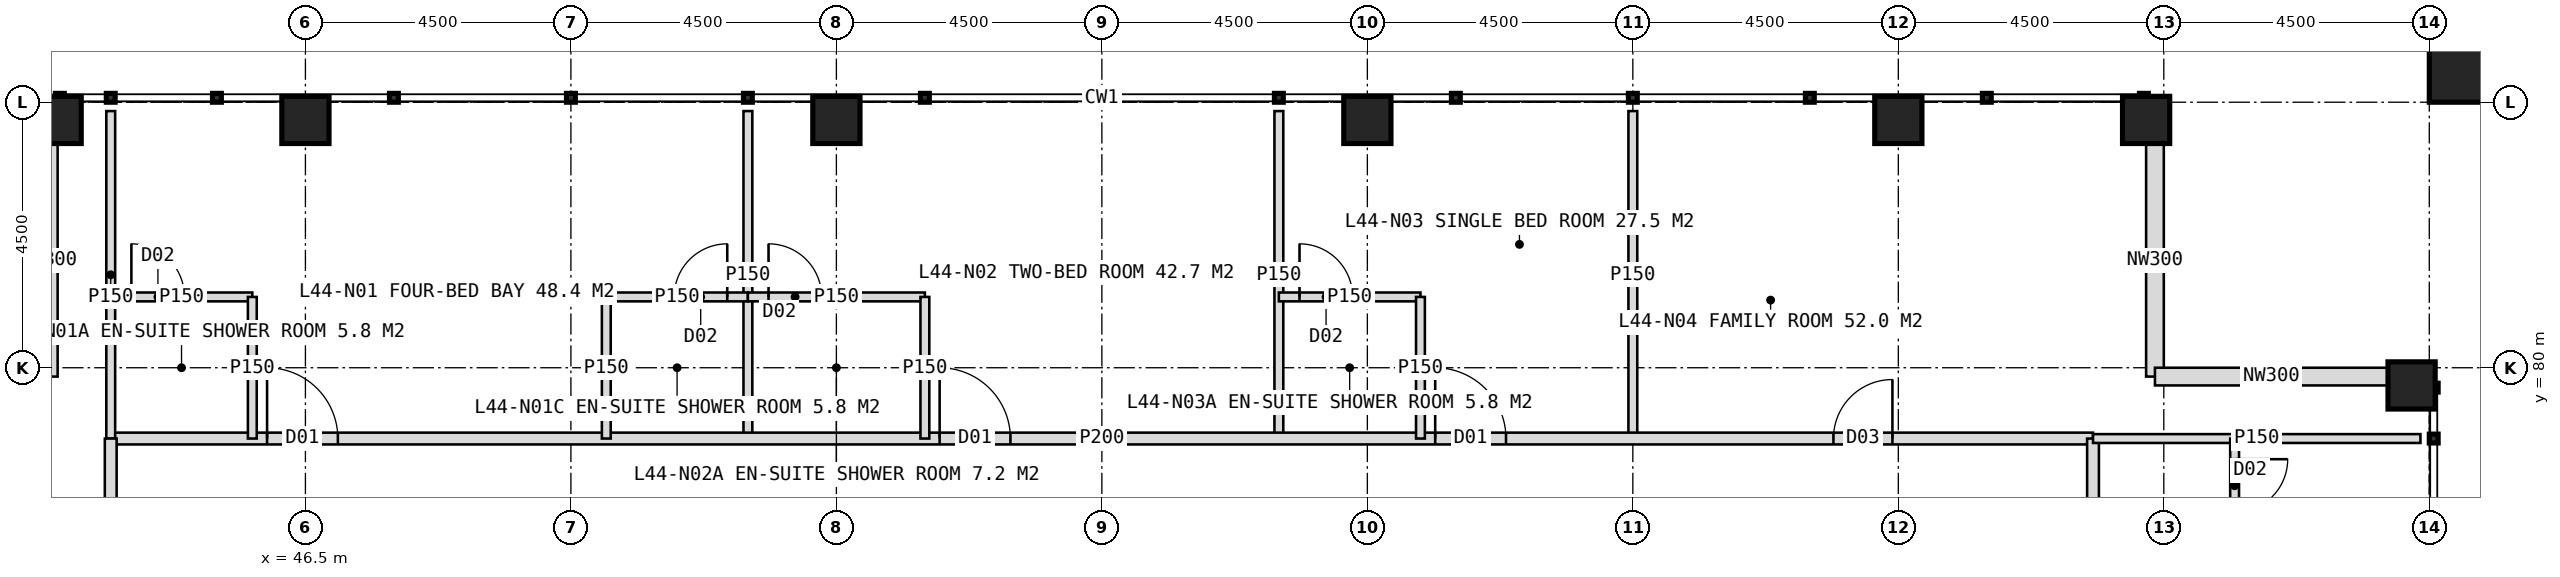
"""IFC4 building model, lengths in metres.
Left out: names, types, materials, properties, quantities, classifications, styles, units other than length and angle.
Written with IfcOpenShell. Run it as: python <this file> out.ifc"""

import sys

from ifc_helpers import new_model, si_unit, direction, frame, frame_2d, origin, origin_2d, place, context, subcontext, project, spatial, rectangle, hollow_rectangle, extrude, element, fill, save


model = new_model("IFC4")
c1 = context("Model", 3, precision=1e-05, world=origin(), true_north=direction((0.0, 1.0)))
c2 = subcontext(c1, "Body", "Model", "MODEL_VIEW")
j1 = project(units=[si_unit("LENGTHUNIT", "METRE"), si_unit("PLANEANGLEUNIT", "RADIAN")], contexts=[c1])
p1 = place(None, origin())
s1 = spatial("IfcSite", under=j1, at=p1, CompositionType="ELEMENT")
p2 = place(p1, origin())
s2 = spatial("IfcBuilding", under=s1, at=p2, CompositionType="ELEMENT")
p3 = place(p2, frame((0.0, 0.0, 185.0)))
s3 = spatial("IfcBuildingStorey", under=s2, at=p3, CompositionType="ELEMENT", Elevation=185.0)
for number, where, z_axis, x_axis in (
    (1, (42.3, 84.2, 0.0), (0.0, 0.0, 1.0), (1.0, 0.0, 0.0)),
    (2, (46.5, 84.2, 0.0), (0.0, 0.0, 1.0), (1.0, 0.0, 0.0)),
    (3, (55.5, 84.2, 0.0), (0.0, 0.0, 1.0), (1.0, 0.0, 0.0)),
    (4, (64.5, 84.2, 0.0), (0.0, 0.0, 1.0), (1.0, 0.0, 0.0)),
    (5, (73.5, 84.2, 0.0), (0.0, 0.0, 1.0), (1.0, 0.0, 0.0)),
    (6, (77.7, 84.2, 0.0), (0.0, 0.0, 1.0), (1.0, 0.0, 0.0)),
    (7, (82.2, 79.7, 0.0), (0.0, 0.0, 1.0), (1.0, 0.0, 0.0)),
):
    element("IfcColumn", number, at=place(p3, frame(where, z_axis=z_axis, x_axis=x_axis)), inside=s3, PredefinedType="COLUMN", context=c2, shape_type="SweptSolid", body=[
        extrude(hollow_rectangle(XDim=0.8, YDim=0.8, WallThickness=0.08, at=origin_2d()), origin(), (0.0, 0.0, 1.0), 4.0),
    ])
p4 = place(p3, frame((83.1, 85.1, 0.0), z_axis=(0.0, 0.0, 1.0), x_axis=(1.0, 0.0, 0.0)))
e8 = element("IfcColumn", 8, at=p4, inside=s3, PredefinedType="COLUMN", context=c2, shape_type="SweptSolid", body=[
    extrude(hollow_rectangle(XDim=1.2, YDim=1.2, WallThickness=0.07, at=origin_2d()), origin(), (0.0, 0.0, 1.0), 4.0),
])
for number, where, z_axis, x_axis in (
    (9, (77.85, 83.8, 0.0), (0.0, 0.0, 1.0), (0.0, -1.0, 0.0)),
    (10, (77.85, 79.85, 0.0), (0.0, 0.0, 1.0), (1.0, 0.0, 0.0)),
    (11, (42.15, 79.85, 0.0), (0.0, 0.0, 1.0), (0.0, 1.0, 0.0)),
):
    element("IfcWall", number, at=place(p3, frame(where, z_axis=z_axis, x_axis=x_axis)), inside=s3, PredefinedType="ELEMENTEDWALL", context=c2, shape_type="SweptSolid", body=[
        extrude(rectangle(XDim=3.95, YDim=0.3, at=frame_2d((1.975, 0.0))), origin(), (0.0, 0.0, 1.0), 2.85),
    ])
for number, where, z_axis, x_axis in (
    (12, (54.0, 78.8, 0.0), (0.0, 0.0, 1.0), (0.0, 1.0, 0.0)),
    (13, (63.0, 78.8, 0.0), (0.0, 0.0, 1.0), (0.0, 1.0, 0.0)),
    (14, (69.0, 78.8, 0.0), (0.0, 0.0, 1.0), (0.0, 1.0, 0.0)),
):
    element("IfcWall", number, at=place(p3, frame(where, z_axis=z_axis, x_axis=x_axis)), inside=s3, PredefinedType="PARTITIONING", context=c2, shape_type="SweptSolid", body=[
        extrude(rectangle(XDim=5.55, YDim=0.15, at=frame_2d((2.775, 0.0))), origin(), (0.0, 0.0, 1.0), 3.75),
    ])
p5 = place(p3, frame((43.2, 78.8, 0.0), z_axis=(0.0, 0.0, 1.0), x_axis=(1.0, 0.0, 0.0)))
e15 = element("IfcWall", 15, at=p5, inside=s3, PredefinedType="PARTITIONING", context=c2, shape_type="SweptSolid", body=[
    extrude(rectangle(XDim=33.6, YDim=0.2, at=frame_2d((16.8, 0.0))), origin(), (0.0, 0.0, 1.0), 3.75),
])
p6 = place(p5, frame((2.65, 0.0, 0.0)))
e16 = element("IfcOpeningElement", 16, at=p6, cuts=e15, PredefinedType="OPENING", context=c2, shape_type="SweptSolid", body=[
    extrude(rectangle(XDim=1.2, YDim=2.2, at=frame_2d((0.6, 1.1))), frame((0.0, 0.11, 0.0), z_axis=(0.0, -1.0, 0.0), x_axis=(1.0, 0.0, 0.0)), (0.0, 0.0, 1.0), 0.22),
])
p7 = place(p5, frame((14.05, 0.0, 0.0)))
e17 = element("IfcOpeningElement", 17, at=p7, cuts=e15, PredefinedType="OPENING", context=c2, shape_type="SweptSolid", body=[
    extrude(rectangle(XDim=1.2, YDim=2.2, at=frame_2d((0.6, 1.1))), frame((0.0, 0.11, 0.0), z_axis=(0.0, -1.0, 0.0), x_axis=(1.0, 0.0, 0.0)), (0.0, 0.0, 1.0), 0.22),
])
p8 = place(p5, frame((22.45, 0.0, 0.0)))
e18 = element("IfcOpeningElement", 18, at=p8, cuts=e15, PredefinedType="OPENING", context=c2, shape_type="SweptSolid", body=[
    extrude(rectangle(XDim=1.2, YDim=2.2, at=frame_2d((0.6, 1.1))), frame((0.0, 0.11, 0.0), z_axis=(0.0, -1.0, 0.0), x_axis=(1.0, 0.0, 0.0)), (0.0, 0.0, 1.0), 0.22),
])
p9 = place(p5, frame((29.2, 0.0, 0.0)))
e19 = element("IfcOpeningElement", 19, at=p9, cuts=e15, PredefinedType="OPENING", context=c2, shape_type="SweptSolid", body=[
    extrude(rectangle(XDim=1.0, YDim=2.1, at=frame_2d((0.5, 1.05))), frame((0.0, 0.11, 0.0), z_axis=(0.0, -1.0, 0.0), x_axis=(1.0, 0.0, 0.0)), (0.0, 0.0, 1.0), 0.22),
])
p10 = place(p3, frame((43.2, 78.8, 0.0), z_axis=(0.0, 0.0, 1.0), x_axis=(0.0, 1.0, 0.0)))
e20 = element("IfcWall", 20, at=p10, inside=s3, PredefinedType="PARTITIONING", context=c2, shape_type="SweptSolid", body=[
    extrude(rectangle(XDim=5.55, YDim=0.15, at=frame_2d((2.775, 0.0))), origin(), (0.0, 0.0, 1.0), 3.75),
])
p11 = place(p3, frame((43.2, 81.2, 0.0), z_axis=(0.0, 0.0, 1.0), x_axis=(1.0, 0.0, 0.0)))
e21 = element("IfcWall", 21, at=p11, inside=s3, PredefinedType="PARTITIONING", context=c2, shape_type="SweptSolid", body=[
    extrude(rectangle(XDim=2.4, YDim=0.15, at=frame_2d((1.2, 0.0))), origin(), (0.0, 0.0, 1.0), 3.75),
])
p12 = place(p11, frame((0.35, 0.0, 0.0)))
e22 = element("IfcOpeningElement", 22, at=p12, cuts=e21, PredefinedType="OPENING", context=c2, shape_type="SweptSolid", body=[
    extrude(rectangle(XDim=0.9, YDim=2.1, at=frame_2d((0.45, 1.05))), frame((0.0, 0.085, 0.0), z_axis=(0.0, -1.0, 0.0), x_axis=(1.0, 0.0, 0.0)), (0.0, 0.0, 1.0), 0.17),
])
p13 = place(p3, frame((45.6, 78.8, 0.0), z_axis=(0.0, 0.0, 1.0), x_axis=(0.0, 1.0, 0.0)))
e23 = element("IfcWall", 23, at=p13, inside=s3, PredefinedType="PARTITIONING", context=c2, shape_type="SweptSolid", body=[
    extrude(rectangle(XDim=2.4, YDim=0.15, at=frame_2d((1.2, 0.0))), origin(), (0.0, 0.0, 1.0), 3.75),
])
p14 = place(p3, frame((51.6, 81.2, 0.0), z_axis=(0.0, 0.0, 1.0), x_axis=(1.0, 0.0, 0.0)))
e24 = element("IfcWall", 24, at=p14, inside=s3, PredefinedType="PARTITIONING", context=c2, shape_type="SweptSolid", body=[
    extrude(rectangle(XDim=2.4, YDim=0.15, at=frame_2d((1.2, 0.0))), origin(), (0.0, 0.0, 1.0), 3.75),
])
p15 = place(p14, frame((1.15, 0.0, 0.0)))
e25 = element("IfcOpeningElement", 25, at=p15, cuts=e24, PredefinedType="OPENING", context=c2, shape_type="SweptSolid", body=[
    extrude(rectangle(XDim=0.9, YDim=2.1, at=frame_2d((0.45, 1.05))), frame((0.0, 0.085, 0.0), z_axis=(0.0, -1.0, 0.0), x_axis=(1.0, 0.0, 0.0)), (0.0, 0.0, 1.0), 0.17),
])
p16 = place(p3, frame((51.6, 78.8, 0.0), z_axis=(0.0, 0.0, 1.0), x_axis=(0.0, 1.0, 0.0)))
e26 = element("IfcWall", 26, at=p16, inside=s3, PredefinedType="PARTITIONING", context=c2, shape_type="SweptSolid", body=[
    extrude(rectangle(XDim=2.4, YDim=0.15, at=frame_2d((1.2, 0.0))), origin(), (0.0, 0.0, 1.0), 3.75),
])
p17 = place(p3, frame((54.0, 81.2, 0.0), z_axis=(0.0, 0.0, 1.0), x_axis=(1.0, 0.0, 0.0)))
e27 = element("IfcWall", 27, at=p17, inside=s3, PredefinedType="PARTITIONING", context=c2, shape_type="SweptSolid", body=[
    extrude(rectangle(XDim=3.0, YDim=0.15, at=frame_2d((1.5, 0.0))), origin(), (0.0, 0.0, 1.0), 3.75),
])
p18 = place(p17, frame((0.35, 0.0, 0.0)))
e28 = element("IfcOpeningElement", 28, at=p18, cuts=e27, PredefinedType="OPENING", context=c2, shape_type="SweptSolid", body=[
    extrude(rectangle(XDim=0.9, YDim=2.1, at=frame_2d((0.45, 1.05))), frame((0.0, 0.085, 0.0), z_axis=(0.0, -1.0, 0.0), x_axis=(1.0, 0.0, 0.0)), (0.0, 0.0, 1.0), 0.17),
])
p19 = place(p3, frame((57.0, 78.8, 0.0), z_axis=(0.0, 0.0, 1.0), x_axis=(0.0, 1.0, 0.0)))
e29 = element("IfcWall", 29, at=p19, inside=s3, PredefinedType="PARTITIONING", context=c2, shape_type="SweptSolid", body=[
    extrude(rectangle(XDim=2.4, YDim=0.15, at=frame_2d((1.2, 0.0))), origin(), (0.0, 0.0, 1.0), 3.75),
])
p20 = place(p3, frame((63.0, 81.2, 0.0), z_axis=(0.0, 0.0, 1.0), x_axis=(1.0, 0.0, 0.0)))
e30 = element("IfcWall", 30, at=p20, inside=s3, PredefinedType="PARTITIONING", context=c2, shape_type="SweptSolid", body=[
    extrude(rectangle(XDim=2.4, YDim=0.15, at=frame_2d((1.2, 0.0))), origin(), (0.0, 0.0, 1.0), 3.75),
])
p21 = place(p20, frame((0.35, 0.0, 0.0)))
e31 = element("IfcOpeningElement", 31, at=p21, cuts=e30, PredefinedType="OPENING", context=c2, shape_type="SweptSolid", body=[
    extrude(rectangle(XDim=0.9, YDim=2.1, at=frame_2d((0.45, 1.05))), frame((0.0, 0.085, 0.0), z_axis=(0.0, -1.0, 0.0), x_axis=(1.0, 0.0, 0.0)), (0.0, 0.0, 1.0), 0.17),
])
p22 = place(p3, frame((65.4, 78.8, 0.0), z_axis=(0.0, 0.0, 1.0), x_axis=(0.0, 1.0, 0.0)))
e32 = element("IfcWall", 32, at=p22, inside=s3, PredefinedType="PARTITIONING", context=c2, shape_type="SweptSolid", body=[
    extrude(rectangle(XDim=2.4, YDim=0.15, at=frame_2d((1.2, 0.0))), origin(), (0.0, 0.0, 1.0), 3.75),
])
p23 = place(p3, frame((43.2, 45.2, 0.0), z_axis=(0.0, 0.0, 1.0), x_axis=(0.0, 1.0, 0.0)))
e33 = element("IfcWall", 33, at=p23, inside=s3, PredefinedType="PARTITIONING", context=c2, shape_type="SweptSolid", body=[
    extrude(rectangle(XDim=33.6, YDim=0.2, at=frame_2d((16.8, 0.0))), origin(), (0.0, 0.0, 1.0), 3.75),
])
p24 = place(p23, frame((2.65, 0.0, 0.0)))
e34 = element("IfcOpeningElement", 34, at=p24, cuts=e33, PredefinedType="OPENING", context=c2, shape_type="SweptSolid", body=[
    extrude(rectangle(XDim=1.2, YDim=2.2, at=frame_2d((0.6, 1.1))), frame((0.0, 0.11, 0.0), z_axis=(0.0, -1.0, 0.0), x_axis=(1.0, 0.0, 0.0)), (0.0, 0.0, 1.0), 0.22),
])
p25 = place(p23, frame((13.45, 0.0, 0.0)))
e35 = element("IfcOpeningElement", 35, at=p25, cuts=e33, PredefinedType="OPENING", context=c2, shape_type="SweptSolid", body=[
    extrude(rectangle(XDim=1.2, YDim=2.2, at=frame_2d((0.6, 1.1))), frame((0.0, 0.11, 0.0), z_axis=(0.0, -1.0, 0.0), x_axis=(1.0, 0.0, 0.0)), (0.0, 0.0, 1.0), 0.22),
])
p26 = place(p23, frame((20.05, 0.0, 0.0)))
e36 = element("IfcOpeningElement", 36, at=p26, cuts=e33, PredefinedType="OPENING", context=c2, shape_type="SweptSolid", body=[
    extrude(rectangle(XDim=1.2, YDim=2.2, at=frame_2d((0.6, 1.1))), frame((0.0, 0.11, 0.0), z_axis=(0.0, -1.0, 0.0), x_axis=(1.0, 0.0, 0.0)), (0.0, 0.0, 1.0), 0.22),
])
p27 = place(p23, frame((29.05, 0.0, 0.0)))
e37 = element("IfcOpeningElement", 37, at=p27, cuts=e33, PredefinedType="OPENING", context=c2, shape_type="SweptSolid", body=[
    extrude(rectangle(XDim=1.2, YDim=2.2, at=frame_2d((0.6, 1.1))), frame((0.0, 0.11, 0.0), z_axis=(0.0, -1.0, 0.0), x_axis=(1.0, 0.0, 0.0)), (0.0, 0.0, 1.0), 0.22),
])
p28 = place(p3, frame((76.8, 78.8, 0.0), z_axis=(0.0, 0.0, 1.0), x_axis=(0.0, -1.0, 0.0)))
e38 = element("IfcWall", 38, at=p28, inside=s3, PredefinedType="PARTITIONING", context=c2, shape_type="SweptSolid", body=[
    extrude(rectangle(XDim=33.6, YDim=0.2, at=frame_2d((16.8, 0.0))), origin(), (0.0, 0.0, 1.0), 3.75),
])
p29 = place(p28, frame((2.65, 0.0, 0.0)))
e39 = element("IfcOpeningElement", 39, at=p29, cuts=e38, PredefinedType="OPENING", context=c2, shape_type="SweptSolid", body=[
    extrude(rectangle(XDim=1.2, YDim=2.2, at=frame_2d((0.6, 1.1))), frame((0.0, 0.11, 0.0), z_axis=(0.0, -1.0, 0.0), x_axis=(1.0, 0.0, 0.0)), (0.0, 0.0, 1.0), 0.22),
])
p30 = place(p28, frame((7.45, 0.0, 0.0)))
e40 = element("IfcOpeningElement", 40, at=p30, cuts=e38, PredefinedType="OPENING", context=c2, shape_type="SweptSolid", body=[
    extrude(rectangle(XDim=1.2, YDim=2.2, at=frame_2d((0.6, 1.1))), frame((0.0, 0.11, 0.0), z_axis=(0.0, -1.0, 0.0), x_axis=(1.0, 0.0, 0.0)), (0.0, 0.0, 1.0), 0.22),
])
p31 = place(p28, frame((13.45, 0.0, 0.0)))
e41 = element("IfcOpeningElement", 41, at=p31, cuts=e38, PredefinedType="OPENING", context=c2, shape_type="SweptSolid", body=[
    extrude(rectangle(XDim=1.2, YDim=2.2, at=frame_2d((0.6, 1.1))), frame((0.0, 0.11, 0.0), z_axis=(0.0, -1.0, 0.0), x_axis=(1.0, 0.0, 0.0)), (0.0, 0.0, 1.0), 0.22),
])
p32 = place(p28, frame((19.45, 0.0, 0.0)))
e42 = element("IfcOpeningElement", 42, at=p32, cuts=e38, PredefinedType="OPENING", context=c2, shape_type="SweptSolid", body=[
    extrude(rectangle(XDim=1.2, YDim=2.2, at=frame_2d((0.6, 1.1))), frame((0.0, 0.11, 0.0), z_axis=(0.0, -1.0, 0.0), x_axis=(1.0, 0.0, 0.0)), (0.0, 0.0, 1.0), 0.22),
])
p33 = place(p28, frame((25.45, 0.0, 0.0)))
e43 = element("IfcOpeningElement", 43, at=p33, cuts=e38, PredefinedType="OPENING", context=c2, shape_type="SweptSolid", body=[
    extrude(rectangle(XDim=1.2, YDim=2.2, at=frame_2d((0.6, 1.1))), frame((0.0, 0.11, 0.0), z_axis=(0.0, -1.0, 0.0), x_axis=(1.0, 0.0, 0.0)), (0.0, 0.0, 1.0), 0.22),
])
p34 = place(p3, frame((76.8, 78.8, 0.0), z_axis=(0.0, 0.0, 1.0), x_axis=(1.0, 0.0, 0.0)))
e44 = element("IfcWall", 44, at=p34, inside=s3, PredefinedType="PARTITIONING", context=c2, shape_type="SweptSolid", body=[
    extrude(rectangle(XDim=5.55, YDim=0.15, at=frame_2d((2.775, 0.0))), origin(), (0.0, 0.0, 1.0), 3.75),
])
p35 = place(p3, frame((79.2, 78.8, 0.0), z_axis=(0.0, 0.0, 1.0), x_axis=(0.0, -1.0, 0.0)))
e45 = element("IfcWall", 45, at=p35, inside=s3, PredefinedType="PARTITIONING", context=c2, shape_type="SweptSolid", body=[
    extrude(rectangle(XDim=2.4, YDim=0.15, at=frame_2d((1.2, 0.0))), origin(), (0.0, 0.0, 1.0), 3.75),
])
p36 = place(p35, frame((0.35, 0.0, 0.0)))
e46 = element("IfcOpeningElement", 46, at=p36, cuts=e45, PredefinedType="OPENING", context=c2, shape_type="SweptSolid", body=[
    extrude(rectangle(XDim=0.9, YDim=2.1, at=frame_2d((0.45, 1.05))), frame((0.0, 0.085, 0.0), z_axis=(0.0, -1.0, 0.0), x_axis=(1.0, 0.0, 0.0)), (0.0, 0.0, 1.0), 0.17),
])
p37 = place(p6, origin())
e47 = element("IfcDoor", 47, at=p37, inside=s3, OperationType="SINGLE_SWING_LEFT", PredefinedType="DOOR", context=c2, shape_type="SweptSolid", body=[
    extrude(rectangle(XDim=1.2, YDim=2.2, at=frame_2d((0.6, 1.1))), frame((0.0, 0.025, 0.0), z_axis=(0.0, -1.0, 0.0), x_axis=(1.0, 0.0, 0.0)), (0.0, 0.0, 1.0), 0.05),
])
fill(e16, e47)
p38 = place(p12, origin())
e48 = element("IfcDoor", 48, at=p38, inside=s3, OperationType="SINGLE_SWING_LEFT", PredefinedType="DOOR", context=c2, shape_type="SweptSolid", body=[
    extrude(rectangle(XDim=0.9, YDim=2.1, at=frame_2d((0.45, 1.05))), frame((0.0, 0.025, 0.0), z_axis=(0.0, -1.0, 0.0), x_axis=(1.0, 0.0, 0.0)), (0.0, 0.0, 1.0), 0.05),
])
fill(e22, e48)
p39 = place(p15, origin())
e49 = element("IfcDoor", 49, at=p39, inside=s3, OperationType="SINGLE_SWING_RIGHT", PredefinedType="DOOR", context=c2, shape_type="SweptSolid", body=[
    extrude(rectangle(XDim=0.9, YDim=2.1, at=frame_2d((0.45, 1.05))), frame((0.0, 0.025, 0.0), z_axis=(0.0, -1.0, 0.0), x_axis=(1.0, 0.0, 0.0)), (0.0, 0.0, 1.0), 0.05),
])
fill(e25, e49)
p40 = place(p7, origin())
e50 = element("IfcDoor", 50, at=p40, inside=s3, OperationType="SINGLE_SWING_LEFT", PredefinedType="DOOR", context=c2, shape_type="SweptSolid", body=[
    extrude(rectangle(XDim=1.2, YDim=2.2, at=frame_2d((0.6, 1.1))), frame((0.0, 0.025, 0.0), z_axis=(0.0, -1.0, 0.0), x_axis=(1.0, 0.0, 0.0)), (0.0, 0.0, 1.0), 0.05),
])
fill(e17, e50)
p41 = place(p18, origin())
e51 = element("IfcDoor", 51, at=p41, inside=s3, OperationType="SINGLE_SWING_LEFT", PredefinedType="DOOR", context=c2, shape_type="SweptSolid", body=[
    extrude(rectangle(XDim=0.9, YDim=2.1, at=frame_2d((0.45, 1.05))), frame((0.0, 0.025, 0.0), z_axis=(0.0, -1.0, 0.0), x_axis=(1.0, 0.0, 0.0)), (0.0, 0.0, 1.0), 0.05),
])
fill(e28, e51)
p42 = place(p8, origin())
e52 = element("IfcDoor", 52, at=p42, inside=s3, OperationType="SINGLE_SWING_LEFT", PredefinedType="DOOR", context=c2, shape_type="SweptSolid", body=[
    extrude(rectangle(XDim=1.2, YDim=2.2, at=frame_2d((0.6, 1.1))), frame((0.0, 0.025, 0.0), z_axis=(0.0, -1.0, 0.0), x_axis=(1.0, 0.0, 0.0)), (0.0, 0.0, 1.0), 0.05),
])
fill(e18, e52)
p43 = place(p21, origin())
e53 = element("IfcDoor", 53, at=p43, inside=s3, OperationType="SINGLE_SWING_LEFT", PredefinedType="DOOR", context=c2, shape_type="SweptSolid", body=[
    extrude(rectangle(XDim=0.9, YDim=2.1, at=frame_2d((0.45, 1.05))), frame((0.0, 0.025, 0.0), z_axis=(0.0, -1.0, 0.0), x_axis=(1.0, 0.0, 0.0)), (0.0, 0.0, 1.0), 0.05),
])
fill(e31, e53)
p44 = place(p9, origin())
e54 = element("IfcDoor", 54, at=p44, inside=s3, OperationType="SINGLE_SWING_RIGHT", PredefinedType="DOOR", context=c2, shape_type="SweptSolid", body=[
    extrude(rectangle(XDim=1.0, YDim=2.1, at=frame_2d((0.5, 1.05))), frame((0.0, 0.025, 0.0), z_axis=(0.0, -1.0, 0.0), x_axis=(1.0, 0.0, 0.0)), (0.0, 0.0, 1.0), 0.05),
])
fill(e19, e54)
p45 = place(p36, origin())
e55 = element("IfcDoor", 55, at=p45, inside=s3, OperationType="SINGLE_SWING_LEFT", PredefinedType="DOOR", context=c2, shape_type="SweptSolid", body=[
    extrude(rectangle(XDim=0.9, YDim=2.1, at=frame_2d((0.45, 1.05))), frame((0.0, 0.025, 0.0), z_axis=(0.0, -1.0, 0.0), x_axis=(1.0, 0.0, 0.0)), (0.0, 0.0, 1.0), 0.05),
])
fill(e46, e55)
save(model, sys.argv[1])
